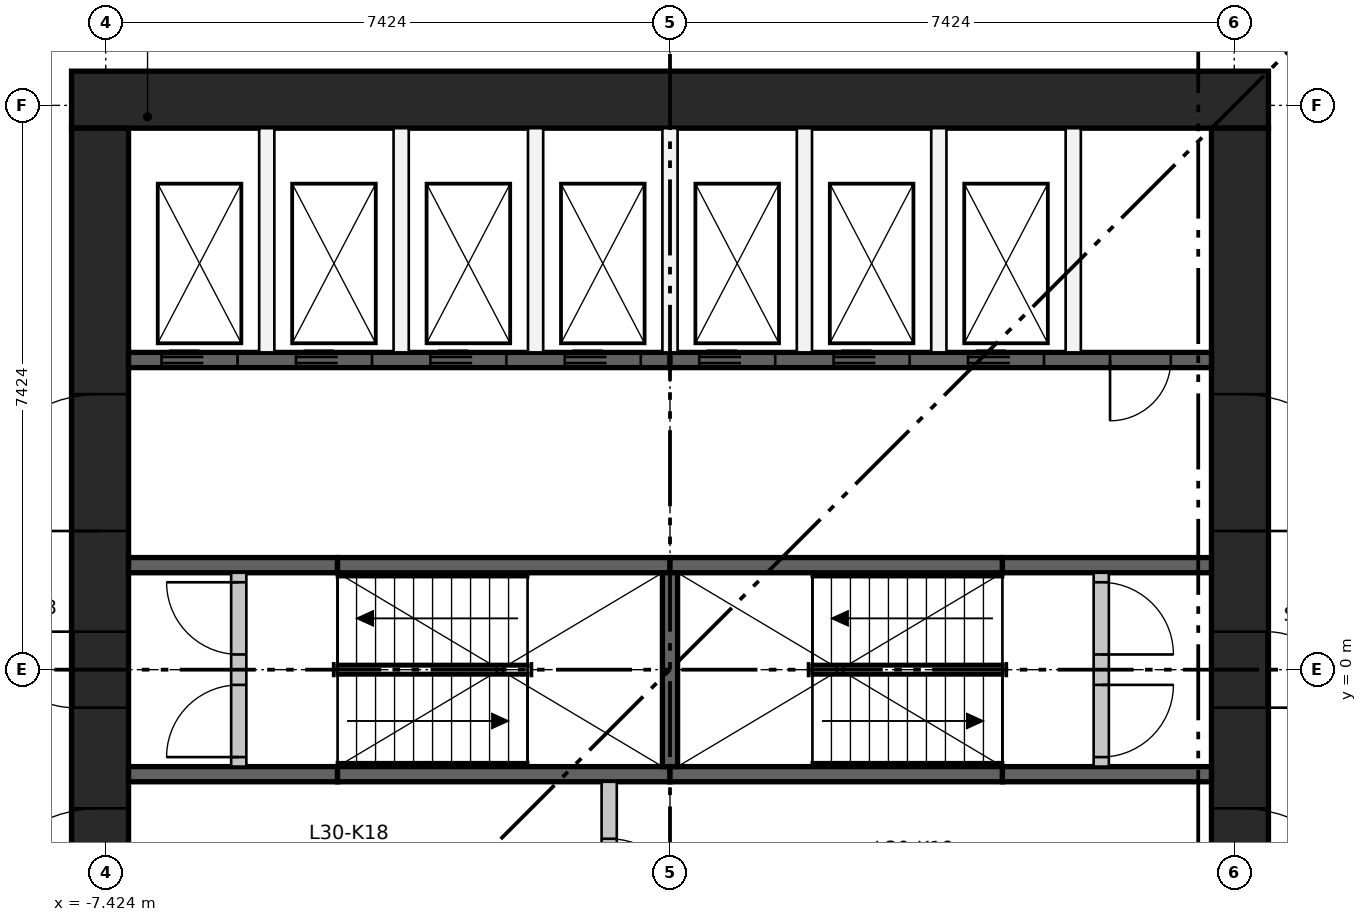
"""IFC4 building model, lengths in metres.
Left out: names, types, materials, properties, quantities, classifications, styles, units other than length and angle.
Written with IfcOpenShell. Run it as: python <this file> out.ifc"""

import sys

from ifc_helpers import new_model, si_unit, direction, frame, frame_2d, origin, place, context, subcontext, project, spatial, rectangle, extrude, element, fill, save


model = new_model("IFC4")
c1 = context("Model", 3, precision=1e-05, world=origin(), true_north=direction((0.0, 1.0)))
c2 = subcontext(c1, "Body", "Model", "MODEL_VIEW")
j1 = project(units=[si_unit("LENGTHUNIT", "METRE"), si_unit("PLANEANGLEUNIT", "RADIAN")], contexts=[c1])
p1 = place(None, origin())
s1 = spatial("IfcSite", under=j1, at=p1, CompositionType="ELEMENT")
p2 = place(p1, origin())
s2 = spatial("IfcBuilding", under=s1, at=p2, CompositionType="ELEMENT")
p3 = place(p2, frame((0.0, 0.0, 116.55)))
s3 = spatial("IfcBuildingStorey", under=s2, at=p3, CompositionType="ELEMENT", Elevation=116.55)
p4 = place(p3, frame((-7.874, 7.499, 0.0), z_axis=(0.0, 0.0, 1.0), x_axis=(1.0, 0.0, 0.0)))
e1 = element("IfcWall", 1, at=p4, inside=s3, PredefinedType="SHEAR", context=c2, shape_type="SweptSolid", body=[
    extrude(rectangle(XDim=15.748, YDim=0.75, at=frame_2d((7.874, 0.0))), origin(), (0.0, 0.0, 1.0), 4.4),
])
p5 = place(p3, frame((-7.499, -7.124, 0.0), z_axis=(0.0, 0.0, 1.0), x_axis=(0.0, 1.0, 0.0)))
e2 = element("IfcWall", 2, at=p5, inside=s3, PredefinedType="SHEAR", context=c2, shape_type="SweptSolid", body=[
    extrude(rectangle(XDim=14.248, YDim=0.75, at=frame_2d((7.124, 0.0))), origin(), (0.0, 0.0, 1.0), 4.4),
])
p6 = place(p5, frame((6.624, 0.0, 0.0)))
e3 = element("IfcOpeningElement", 3, at=p6, cuts=e2, PredefinedType="OPENING", context=c2, shape_type="SweptSolid", body=[
    extrude(rectangle(XDim=1.0, YDim=2.1, at=frame_2d((0.5, 1.05))), frame((0.0, 0.385, 0.0), z_axis=(0.0, -1.0, 0.0), x_axis=(1.0, 0.0, 0.0)), (0.0, 0.0, 1.0), 0.77),
])
p7 = place(p5, frame((3.5, 0.0, 0.0)))
e4 = element("IfcOpeningElement", 4, at=p7, cuts=e2, PredefinedType="OPENING", context=c2, shape_type="SweptSolid", body=[
    extrude(rectangle(XDim=1.8, YDim=2.1, at=frame_2d((0.9, 1.05))), frame((0.0, 0.385, 0.0), z_axis=(0.0, -1.0, 0.0), x_axis=(1.0, 0.0, 0.0)), (0.0, 0.0, 1.0), 0.77),
])
p8 = place(p5, frame((8.948, 0.0, 0.0)))
e5 = element("IfcOpeningElement", 5, at=p8, cuts=e2, PredefinedType="OPENING", context=c2, shape_type="SweptSolid", body=[
    extrude(rectangle(XDim=1.8, YDim=2.1, at=frame_2d((0.9, 1.05))), frame((0.0, 0.385, 0.0), z_axis=(0.0, -1.0, 0.0), x_axis=(1.0, 0.0, 0.0)), (0.0, 0.0, 1.0), 0.77),
])
p9 = place(p3, frame((7.499, -7.124, 0.0), z_axis=(0.0, 0.0, 1.0), x_axis=(0.0, 1.0, 0.0)))
e6 = element("IfcWall", 6, at=p9, inside=s3, PredefinedType="SHEAR", context=c2, shape_type="SweptSolid", body=[
    extrude(rectangle(XDim=14.248, YDim=0.75, at=frame_2d((7.124, 0.0))), origin(), (0.0, 0.0, 1.0), 4.4),
])
p10 = place(p9, frame((6.624, 0.0, 0.0)))
e7 = element("IfcOpeningElement", 7, at=p10, cuts=e6, PredefinedType="OPENING", context=c2, shape_type="SweptSolid", body=[
    extrude(rectangle(XDim=1.0, YDim=2.1, at=frame_2d((0.5, 1.05))), frame((0.0, 0.385, 0.0), z_axis=(0.0, -1.0, 0.0), x_axis=(1.0, 0.0, 0.0)), (0.0, 0.0, 1.0), 0.77),
])
p11 = place(p9, frame((3.5, 0.0, 0.0)))
e8 = element("IfcOpeningElement", 8, at=p11, cuts=e6, PredefinedType="OPENING", context=c2, shape_type="SweptSolid", body=[
    extrude(rectangle(XDim=1.8, YDim=2.1, at=frame_2d((0.9, 1.05))), frame((0.0, 0.385, 0.0), z_axis=(0.0, -1.0, 0.0), x_axis=(1.0, 0.0, 0.0)), (0.0, 0.0, 1.0), 0.77),
])
p12 = place(p9, frame((8.948, 0.0, 0.0)))
e9 = element("IfcOpeningElement", 9, at=p12, cuts=e6, PredefinedType="OPENING", context=c2, shape_type="SweptSolid", body=[
    extrude(rectangle(XDim=1.8, YDim=2.1, at=frame_2d((0.9, 1.05))), frame((0.0, 0.385, 0.0), z_axis=(0.0, -1.0, 0.0), x_axis=(1.0, 0.0, 0.0)), (0.0, 0.0, 1.0), 0.77),
])
p13 = place(p3, frame((-7.124, 4.074, 0.0), z_axis=(0.0, 0.0, 1.0), x_axis=(1.0, 0.0, 0.0)))
e10 = element("IfcWall", 10, at=p13, inside=s3, PredefinedType="SHEAR", context=c2, shape_type="SweptSolid", body=[
    extrude(rectangle(XDim=7.124, YDim=0.2, at=frame_2d((3.562, 0.0))), origin(), (0.0, 0.0, 1.0), 4.05),
])
p14 = place(p13, frame((0.434, 0.0, 0.0)))
e11 = element("IfcOpeningElement", 11, at=p14, cuts=e10, PredefinedType="OPENING", context=c2, shape_type="SweptSolid", body=[
    extrude(rectangle(XDim=1.0, YDim=2.1, at=frame_2d((0.5, 1.05))), frame((0.0, 0.11, 0.0), z_axis=(0.0, -1.0, 0.0), x_axis=(1.0, 0.0, 0.0)), (0.0, 0.0, 1.0), 0.22),
])
p15 = place(p13, frame((2.203, 0.0, 0.0)))
e12 = element("IfcOpeningElement", 12, at=p15, cuts=e10, PredefinedType="OPENING", context=c2, shape_type="SweptSolid", body=[
    extrude(rectangle(XDim=1.0, YDim=2.1, at=frame_2d((0.5, 1.05))), frame((0.0, 0.11, 0.0), z_axis=(0.0, -1.0, 0.0), x_axis=(1.0, 0.0, 0.0)), (0.0, 0.0, 1.0), 0.22),
])
p16 = place(p13, frame((3.971, 0.0, 0.0)))
e13 = element("IfcOpeningElement", 13, at=p16, cuts=e10, PredefinedType="OPENING", context=c2, shape_type="SweptSolid", body=[
    extrude(rectangle(XDim=1.0, YDim=2.1, at=frame_2d((0.5, 1.05))), frame((0.0, 0.11, 0.0), z_axis=(0.0, -1.0, 0.0), x_axis=(1.0, 0.0, 0.0)), (0.0, 0.0, 1.0), 0.22),
])
p17 = place(p13, frame((5.74, 0.0, 0.0)))
e14 = element("IfcOpeningElement", 14, at=p17, cuts=e10, PredefinedType="OPENING", context=c2, shape_type="SweptSolid", body=[
    extrude(rectangle(XDim=1.0, YDim=2.1, at=frame_2d((0.5, 1.05))), frame((0.0, 0.11, 0.0), z_axis=(0.0, -1.0, 0.0), x_axis=(1.0, 0.0, 0.0)), (0.0, 0.0, 1.0), 0.22),
])
p18 = place(p3, frame((0.0, 4.074, 0.0), z_axis=(0.0, 0.0, 1.0), x_axis=(1.0, 0.0, 0.0)))
e15 = element("IfcWall", 15, at=p18, inside=s3, PredefinedType="SHEAR", context=c2, shape_type="SweptSolid", body=[
    extrude(rectangle(XDim=7.124, YDim=0.2, at=frame_2d((3.562, 0.0))), origin(), (0.0, 0.0, 1.0), 4.05),
])
p19 = place(p18, frame((0.384, 0.0, 0.0)))
e16 = element("IfcOpeningElement", 16, at=p19, cuts=e15, PredefinedType="OPENING", context=c2, shape_type="SweptSolid", body=[
    extrude(rectangle(XDim=1.0, YDim=2.1, at=frame_2d((0.5, 1.05))), frame((0.0, 0.11, 0.0), z_axis=(0.0, -1.0, 0.0), x_axis=(1.0, 0.0, 0.0)), (0.0, 0.0, 1.0), 0.22),
])
p20 = place(p18, frame((2.153, 0.0, 0.0)))
e17 = element("IfcOpeningElement", 17, at=p20, cuts=e15, PredefinedType="OPENING", context=c2, shape_type="SweptSolid", body=[
    extrude(rectangle(XDim=1.0, YDim=2.1, at=frame_2d((0.5, 1.05))), frame((0.0, 0.11, 0.0), z_axis=(0.0, -1.0, 0.0), x_axis=(1.0, 0.0, 0.0)), (0.0, 0.0, 1.0), 0.22),
])
p21 = place(p18, frame((3.921, 0.0, 0.0)))
e18 = element("IfcOpeningElement", 18, at=p21, cuts=e15, PredefinedType="OPENING", context=c2, shape_type="SweptSolid", body=[
    extrude(rectangle(XDim=1.0, YDim=2.1, at=frame_2d((0.5, 1.05))), frame((0.0, 0.11, 0.0), z_axis=(0.0, -1.0, 0.0), x_axis=(1.0, 0.0, 0.0)), (0.0, 0.0, 1.0), 0.22),
])
p22 = place(p18, frame((5.79, 0.0, 0.0)))
e19 = element("IfcOpeningElement", 19, at=p22, cuts=e15, PredefinedType="OPENING", context=c2, shape_type="SweptSolid", body=[
    extrude(rectangle(XDim=0.8, YDim=2.1, at=frame_2d((0.4, 1.05))), frame((0.0, 0.11, 0.0), z_axis=(0.0, -1.0, 0.0), x_axis=(1.0, 0.0, 0.0)), (0.0, 0.0, 1.0), 0.22),
])
p23 = place(p3, frame((-7.124, -1.375, 0.0), z_axis=(0.0, 0.0, 1.0), x_axis=(1.0, 0.0, 0.0)))
e20 = element("IfcWall", 20, at=p23, inside=s3, PredefinedType="SHEAR", context=c2, shape_type="SweptSolid", body=[
    extrude(rectangle(XDim=2.75, YDim=0.2, at=frame_2d((1.375, 0.0))), origin(), (0.0, 0.0, 1.0), 4.05),
])
for number, where, z_axis, x_axis in (
    (21, (-4.374, -1.375, 0.0), (0.0, 0.0, 1.0), (1.0, 0.0, 0.0)),
    (22, (0.0, -1.375, 0.0), (0.0, 0.0, 1.0), (1.0, 0.0, 0.0)),
):
    element("IfcWall", number, at=place(p3, frame(where, z_axis=z_axis, x_axis=x_axis)), inside=s3, PredefinedType="SHEAR", context=c2, shape_type="SweptSolid", body=[
        extrude(rectangle(XDim=4.374, YDim=0.2, at=frame_2d((2.187, 0.0))), origin(), (0.0, 0.0, 1.0), 4.05),
    ])
for number, where, z_axis, x_axis in (
    (23, (4.374, -1.375, 0.0), (0.0, 0.0, 1.0), (1.0, 0.0, 0.0)),
    (24, (-7.124, 1.375, 0.0), (0.0, 0.0, 1.0), (1.0, 0.0, 0.0)),
):
    element("IfcWall", number, at=place(p3, frame(where, z_axis=z_axis, x_axis=x_axis)), inside=s3, PredefinedType="SHEAR", context=c2, shape_type="SweptSolid", body=[
        extrude(rectangle(XDim=2.75, YDim=0.2, at=frame_2d((1.375, 0.0))), origin(), (0.0, 0.0, 1.0), 4.05),
    ])
for number, where, z_axis, x_axis in (
    (25, (-4.374, 1.375, 0.0), (0.0, 0.0, 1.0), (1.0, 0.0, 0.0)),
    (26, (0.0, 1.375, 0.0), (0.0, 0.0, 1.0), (1.0, 0.0, 0.0)),
):
    element("IfcWall", number, at=place(p3, frame(where, z_axis=z_axis, x_axis=x_axis)), inside=s3, PredefinedType="SHEAR", context=c2, shape_type="SweptSolid", body=[
        extrude(rectangle(XDim=4.374, YDim=0.2, at=frame_2d((2.187, 0.0))), origin(), (0.0, 0.0, 1.0), 4.05),
    ])
p24 = place(p3, frame((4.374, 1.375, 0.0), z_axis=(0.0, 0.0, 1.0), x_axis=(1.0, 0.0, 0.0)))
e27 = element("IfcWall", 27, at=p24, inside=s3, PredefinedType="SHEAR", context=c2, shape_type="SweptSolid", body=[
    extrude(rectangle(XDim=2.75, YDim=0.2, at=frame_2d((1.375, 0.0))), origin(), (0.0, 0.0, 1.0), 4.05),
])
p25 = place(p3, frame((0.0, -1.275, 0.0), z_axis=(0.0, 0.0, 1.0), x_axis=(0.0, 1.0, 0.0)))
e28 = element("IfcWall", 28, at=p25, inside=s3, PredefinedType="SHEAR", context=c2, shape_type="SweptSolid", body=[
    extrude(rectangle(XDim=2.55, YDim=0.2, at=frame_2d((1.275, 0.0))), origin(), (0.0, 0.0, 1.0), 4.05),
])
p26 = place(p3, frame((-0.8, -3.974, 0.0), z_axis=(0.0, 0.0, 1.0), x_axis=(0.0, 1.0, 0.0)))
e29 = element("IfcWall", 29, at=p26, inside=s3, PredefinedType="PARTITIONING", context=c2, shape_type="SweptSolid", body=[
    extrude(rectangle(XDim=2.499, YDim=0.2, at=frame_2d((1.25, 0.0))), origin(), (0.0, 0.0, 1.0), 4.05),
])
p27 = place(p26, frame((0.75, 0.0, 0.0)))
e30 = element("IfcOpeningElement", 30, at=p27, cuts=e29, PredefinedType="OPENING", context=c2, shape_type="SweptSolid", body=[
    extrude(rectangle(XDim=1.0, YDim=2.1, at=frame_2d((0.5, 1.05))), frame((0.0, 0.11, 0.0), z_axis=(0.0, -1.0, 0.0), x_axis=(1.0, 0.0, 0.0)), (0.0, 0.0, 1.0), 0.22),
])
for number, where, z_axis, x_axis in (
    (31, (-5.305, 4.174, 0.0), (0.0, 0.0, 1.0), (0.0, 1.0, 0.0)),
    (32, (-3.537, 4.174, 0.0), (0.0, 0.0, 1.0), (0.0, 1.0, 0.0)),
    (33, (-1.769, 4.174, 0.0), (0.0, 0.0, 1.0), (0.0, 1.0, 0.0)),
    (34, (0.0, 4.174, 0.0), (0.0, 0.0, 1.0), (0.0, 1.0, 0.0)),
    (35, (1.769, 4.174, 0.0), (0.0, 0.0, 1.0), (0.0, 1.0, 0.0)),
    (36, (3.537, 4.174, 0.0), (0.0, 0.0, 1.0), (0.0, 1.0, 0.0)),
    (37, (5.305, 4.174, 0.0), (0.0, 0.0, 1.0), (0.0, 1.0, 0.0)),
):
    element("IfcWall", number, at=place(p3, frame(where, z_axis=z_axis, x_axis=x_axis)), inside=s3, PredefinedType="PARTITIONING", context=c2, shape_type="SweptSolid", body=[
        extrude(rectangle(XDim=2.95, YDim=0.2, at=frame_2d((1.475, 0.0))), origin(), (0.0, 0.0, 1.0), 4.05),
    ])
p28 = place(p3, frame((-5.674, -1.275, 0.0), z_axis=(0.0, 0.0, 1.0), x_axis=(0.0, 1.0, 0.0)))
e38 = element("IfcWall", 38, at=p28, inside=s3, PredefinedType="PARTITIONING", context=c2, shape_type="SweptSolid", body=[
    extrude(rectangle(XDim=2.55, YDim=0.2, at=frame_2d((1.275, 0.0))), origin(), (0.0, 0.0, 1.0), 4.05),
])
p29 = place(p28, frame((0.125, 0.0, 0.0)))
e39 = element("IfcOpeningElement", 39, at=p29, cuts=e38, PredefinedType="OPENING", context=c2, shape_type="SweptSolid", body=[
    extrude(rectangle(XDim=0.95, YDim=2.1, at=frame_2d((0.475, 1.05))), frame((0.0, 0.11, 0.0), z_axis=(0.0, -1.0, 0.0), x_axis=(1.0, 0.0, 0.0)), (0.0, 0.0, 1.0), 0.22),
])
p30 = place(p28, frame((1.475, 0.0, 0.0)))
e40 = element("IfcOpeningElement", 40, at=p30, cuts=e38, PredefinedType="OPENING", context=c2, shape_type="SweptSolid", body=[
    extrude(rectangle(XDim=0.95, YDim=2.1, at=frame_2d((0.475, 1.05))), frame((0.0, 0.11, 0.0), z_axis=(0.0, -1.0, 0.0), x_axis=(1.0, 0.0, 0.0)), (0.0, 0.0, 1.0), 0.22),
])
p31 = place(p3, frame((5.674, -1.275, 0.0), z_axis=(0.0, 0.0, 1.0), x_axis=(0.0, 1.0, 0.0)))
e41 = element("IfcWall", 41, at=p31, inside=s3, PredefinedType="PARTITIONING", context=c2, shape_type="SweptSolid", body=[
    extrude(rectangle(XDim=2.55, YDim=0.2, at=frame_2d((1.275, 0.0))), origin(), (0.0, 0.0, 1.0), 4.05),
])
p32 = place(p31, frame((0.125, 0.0, 0.0)))
e42 = element("IfcOpeningElement", 42, at=p32, cuts=e41, PredefinedType="OPENING", context=c2, shape_type="SweptSolid", body=[
    extrude(rectangle(XDim=0.95, YDim=2.1, at=frame_2d((0.475, 1.05))), frame((0.0, 0.11, 0.0), z_axis=(0.0, -1.0, 0.0), x_axis=(1.0, 0.0, 0.0)), (0.0, 0.0, 1.0), 0.22),
])
p33 = place(p31, frame((1.475, 0.0, 0.0)))
e43 = element("IfcOpeningElement", 43, at=p33, cuts=e41, PredefinedType="OPENING", context=c2, shape_type="SweptSolid", body=[
    extrude(rectangle(XDim=0.95, YDim=2.1, at=frame_2d((0.475, 1.05))), frame((0.0, 0.11, 0.0), z_axis=(0.0, -1.0, 0.0), x_axis=(1.0, 0.0, 0.0)), (0.0, 0.0, 1.0), 0.22),
])
p34 = place(p14, frame((1.0, 0.0, 0.0), z_axis=(0.0, 0.0, 1.0), x_axis=(-1.0, 0.0, 0.0)))
e44 = element("IfcDoor", 44, at=p34, inside=s3, OperationType="DOUBLE_DOOR_SLIDING", PredefinedType="DOOR", context=c2, shape_type="SweptSolid", body=[
    extrude(rectangle(XDim=1.0, YDim=2.1, at=frame_2d((0.5, 1.05))), frame((0.0, 0.025, 0.0), z_axis=(0.0, -1.0, 0.0), x_axis=(1.0, 0.0, 0.0)), (0.0, 0.0, 1.0), 0.05),
])
fill(e11, e44)
p35 = place(p15, frame((1.0, 0.0, 0.0), z_axis=(0.0, 0.0, 1.0), x_axis=(-1.0, 0.0, 0.0)))
e45 = element("IfcDoor", 45, at=p35, inside=s3, OperationType="DOUBLE_DOOR_SLIDING", PredefinedType="DOOR", context=c2, shape_type="SweptSolid", body=[
    extrude(rectangle(XDim=1.0, YDim=2.1, at=frame_2d((0.5, 1.05))), frame((0.0, 0.025, 0.0), z_axis=(0.0, -1.0, 0.0), x_axis=(1.0, 0.0, 0.0)), (0.0, 0.0, 1.0), 0.05),
])
fill(e12, e45)
p36 = place(p16, frame((1.0, 0.0, 0.0), z_axis=(0.0, 0.0, 1.0), x_axis=(-1.0, 0.0, 0.0)))
e46 = element("IfcDoor", 46, at=p36, inside=s3, OperationType="DOUBLE_DOOR_SLIDING", PredefinedType="DOOR", context=c2, shape_type="SweptSolid", body=[
    extrude(rectangle(XDim=1.0, YDim=2.1, at=frame_2d((0.5, 1.05))), frame((0.0, 0.025, 0.0), z_axis=(0.0, -1.0, 0.0), x_axis=(1.0, 0.0, 0.0)), (0.0, 0.0, 1.0), 0.05),
])
fill(e13, e46)
p37 = place(p17, frame((1.0, 0.0, 0.0), z_axis=(0.0, 0.0, 1.0), x_axis=(-1.0, 0.0, 0.0)))
e47 = element("IfcDoor", 47, at=p37, inside=s3, OperationType="DOUBLE_DOOR_SLIDING", PredefinedType="DOOR", context=c2, shape_type="SweptSolid", body=[
    extrude(rectangle(XDim=1.0, YDim=2.1, at=frame_2d((0.5, 1.05))), frame((0.0, 0.025, 0.0), z_axis=(0.0, -1.0, 0.0), x_axis=(1.0, 0.0, 0.0)), (0.0, 0.0, 1.0), 0.05),
])
fill(e14, e47)
p38 = place(p19, frame((1.0, 0.0, 0.0), z_axis=(0.0, 0.0, 1.0), x_axis=(-1.0, 0.0, 0.0)))
e48 = element("IfcDoor", 48, at=p38, inside=s3, OperationType="DOUBLE_DOOR_SLIDING", PredefinedType="DOOR", context=c2, shape_type="SweptSolid", body=[
    extrude(rectangle(XDim=1.0, YDim=2.1, at=frame_2d((0.5, 1.05))), frame((0.0, 0.025, 0.0), z_axis=(0.0, -1.0, 0.0), x_axis=(1.0, 0.0, 0.0)), (0.0, 0.0, 1.0), 0.05),
])
fill(e16, e48)
p39 = place(p20, frame((1.0, 0.0, 0.0), z_axis=(0.0, 0.0, 1.0), x_axis=(-1.0, 0.0, 0.0)))
e49 = element("IfcDoor", 49, at=p39, inside=s3, OperationType="DOUBLE_DOOR_SLIDING", PredefinedType="DOOR", context=c2, shape_type="SweptSolid", body=[
    extrude(rectangle(XDim=1.0, YDim=2.1, at=frame_2d((0.5, 1.05))), frame((0.0, 0.025, 0.0), z_axis=(0.0, -1.0, 0.0), x_axis=(1.0, 0.0, 0.0)), (0.0, 0.0, 1.0), 0.05),
])
fill(e17, e49)
p40 = place(p21, frame((1.0, 0.0, 0.0), z_axis=(0.0, 0.0, 1.0), x_axis=(-1.0, 0.0, 0.0)))
e50 = element("IfcDoor", 50, at=p40, inside=s3, OperationType="DOUBLE_DOOR_SLIDING", PredefinedType="DOOR", context=c2, shape_type="SweptSolid", body=[
    extrude(rectangle(XDim=1.0, YDim=2.1, at=frame_2d((0.5, 1.05))), frame((0.0, 0.025, 0.0), z_axis=(0.0, -1.0, 0.0), x_axis=(1.0, 0.0, 0.0)), (0.0, 0.0, 1.0), 0.05),
])
fill(e18, e50)
p41 = place(p29, origin())
e51 = element("IfcDoor", 51, at=p41, inside=s3, OperationType="SINGLE_SWING_LEFT", PredefinedType="DOOR", context=c2, shape_type="SweptSolid", body=[
    extrude(rectangle(XDim=0.95, YDim=2.1, at=frame_2d((0.475, 1.05))), frame((0.0, 0.025, 0.0), z_axis=(0.0, -1.0, 0.0), x_axis=(1.0, 0.0, 0.0)), (0.0, 0.0, 1.0), 0.05),
])
fill(e39, e51)
p42 = place(p30, origin())
e52 = element("IfcDoor", 52, at=p42, inside=s3, OperationType="SINGLE_SWING_RIGHT", PredefinedType="DOOR", context=c2, shape_type="SweptSolid", body=[
    extrude(rectangle(XDim=0.95, YDim=2.1, at=frame_2d((0.475, 1.05))), frame((0.0, 0.025, 0.0), z_axis=(0.0, -1.0, 0.0), x_axis=(1.0, 0.0, 0.0)), (0.0, 0.0, 1.0), 0.05),
])
fill(e40, e52)
p43 = place(p32, frame((0.95, 0.0, 0.0), z_axis=(0.0, 0.0, 1.0), x_axis=(-1.0, 0.0, 0.0)))
e53 = element("IfcDoor", 53, at=p43, inside=s3, OperationType="SINGLE_SWING_RIGHT", PredefinedType="DOOR", context=c2, shape_type="SweptSolid", body=[
    extrude(rectangle(XDim=0.95, YDim=2.1, at=frame_2d((0.475, 1.05))), frame((0.0, 0.025, 0.0), z_axis=(0.0, -1.0, 0.0), x_axis=(1.0, 0.0, 0.0)), (0.0, 0.0, 1.0), 0.05),
])
fill(e42, e53)
p44 = place(p33, frame((0.95, 0.0, 0.0), z_axis=(0.0, 0.0, 1.0), x_axis=(-1.0, 0.0, 0.0)))
e54 = element("IfcDoor", 54, at=p44, inside=s3, OperationType="SINGLE_SWING_LEFT", PredefinedType="DOOR", context=c2, shape_type="SweptSolid", body=[
    extrude(rectangle(XDim=0.95, YDim=2.1, at=frame_2d((0.475, 1.05))), frame((0.0, 0.025, 0.0), z_axis=(0.0, -1.0, 0.0), x_axis=(1.0, 0.0, 0.0)), (0.0, 0.0, 1.0), 0.05),
])
fill(e43, e54)
p45 = place(p27, frame((1.0, 0.0, 0.0), z_axis=(0.0, 0.0, 1.0), x_axis=(-1.0, 0.0, 0.0)))
e55 = element("IfcDoor", 55, at=p45, inside=s3, OperationType="SINGLE_SWING_LEFT", PredefinedType="DOOR", context=c2, shape_type="SweptSolid", body=[
    extrude(rectangle(XDim=1.0, YDim=2.1, at=frame_2d((0.5, 1.05))), frame((0.0, 0.025, 0.0), z_axis=(0.0, -1.0, 0.0), x_axis=(1.0, 0.0, 0.0)), (0.0, 0.0, 1.0), 0.05),
])
fill(e30, e55)
p46 = place(p22, frame((0.8, 0.0, 0.0), z_axis=(0.0, 0.0, 1.0), x_axis=(-1.0, 0.0, 0.0)))
e56 = element("IfcDoor", 56, at=p46, inside=s3, OperationType="SINGLE_SWING_LEFT", PredefinedType="DOOR", context=c2, shape_type="SweptSolid", body=[
    extrude(rectangle(XDim=0.8, YDim=2.1, at=frame_2d((0.4, 1.05))), frame((0.0, 0.025, 0.0), z_axis=(0.0, -1.0, 0.0), x_axis=(1.0, 0.0, 0.0)), (0.0, 0.0, 1.0), 0.05),
])
fill(e19, e56)
p47 = place(p6, origin())
e57 = element("IfcDoor", 57, at=p47, inside=s3, OperationType="SINGLE_SWING_RIGHT", PredefinedType="DOOR", context=c2, shape_type="SweptSolid", body=[
    extrude(rectangle(XDim=1.0, YDim=2.1, at=frame_2d((0.5, 1.05))), frame((0.0, 0.375, 0.0), z_axis=(0.0, -1.0, 0.0), x_axis=(1.0, 0.0, 0.0)), (0.0, 0.0, 1.0), 0.05),
])
fill(e3, e57)
p48 = place(p7, origin())
e58 = element("IfcDoor", 58, at=p48, inside=s3, OperationType="DOUBLE_DOOR_SINGLE_SWING", PredefinedType="DOOR", context=c2, shape_type="SweptSolid", body=[
    extrude(rectangle(XDim=1.8, YDim=2.1, at=frame_2d((0.9, 1.05))), frame((0.0, 0.025, 0.0), z_axis=(0.0, -1.0, 0.0), x_axis=(1.0, 0.0, 0.0)), (0.0, 0.0, 1.0), 0.05),
])
fill(e4, e58)
p49 = place(p8, origin())
e59 = element("IfcDoor", 59, at=p49, inside=s3, OperationType="DOUBLE_DOOR_SINGLE_SWING", PredefinedType="DOOR", context=c2, shape_type="SweptSolid", body=[
    extrude(rectangle(XDim=1.8, YDim=2.1, at=frame_2d((0.9, 1.05))), frame((0.0, 0.025, 0.0), z_axis=(0.0, -1.0, 0.0), x_axis=(1.0, 0.0, 0.0)), (0.0, 0.0, 1.0), 0.05),
])
fill(e5, e59)
p50 = place(p10, frame((1.0, 0.0, 0.0), z_axis=(0.0, 0.0, 1.0), x_axis=(-1.0, 0.0, 0.0)))
e60 = element("IfcDoor", 60, at=p50, inside=s3, OperationType="SINGLE_SWING_LEFT", PredefinedType="DOOR", context=c2, shape_type="SweptSolid", body=[
    extrude(rectangle(XDim=1.0, YDim=2.1, at=frame_2d((0.5, 1.05))), frame((0.0, 0.375, 0.0), z_axis=(0.0, -1.0, 0.0), x_axis=(1.0, 0.0, 0.0)), (0.0, 0.0, 1.0), 0.05),
])
fill(e7, e60)
p51 = place(p11, frame((1.8, 0.0, 0.0), z_axis=(0.0, 0.0, 1.0), x_axis=(-1.0, 0.0, 0.0)))
e61 = element("IfcDoor", 61, at=p51, inside=s3, OperationType="DOUBLE_DOOR_SINGLE_SWING", PredefinedType="DOOR", context=c2, shape_type="SweptSolid", body=[
    extrude(rectangle(XDim=1.8, YDim=2.1, at=frame_2d((0.9, 1.05))), frame((0.0, 0.025, 0.0), z_axis=(0.0, -1.0, 0.0), x_axis=(1.0, 0.0, 0.0)), (0.0, 0.0, 1.0), 0.05),
])
fill(e8, e61)
p52 = place(p12, frame((1.8, 0.0, 0.0), z_axis=(0.0, 0.0, 1.0), x_axis=(-1.0, 0.0, 0.0)))
e62 = element("IfcDoor", 62, at=p52, inside=s3, OperationType="DOUBLE_DOOR_SINGLE_SWING", PredefinedType="DOOR", context=c2, shape_type="SweptSolid", body=[
    extrude(rectangle(XDim=1.8, YDim=2.1, at=frame_2d((0.9, 1.05))), frame((0.0, 0.025, 0.0), z_axis=(0.0, -1.0, 0.0), x_axis=(1.0, 0.0, 0.0)), (0.0, 0.0, 1.0), 0.05),
])
fill(e9, e62)
save(model, sys.argv[1])
